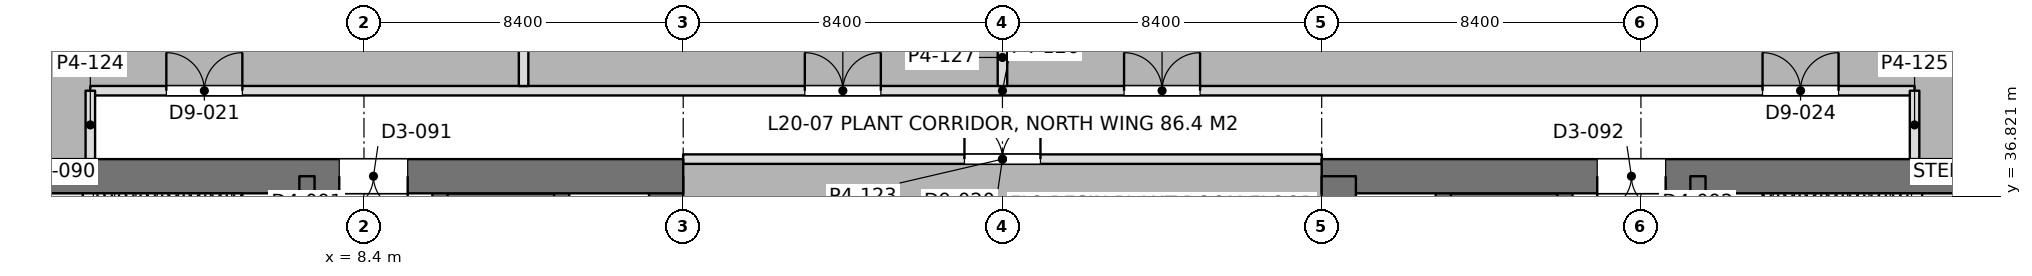
"""IFC4 building model, lengths in metres.
Left out: names, types, materials, properties, quantities, classifications, styles, units other than length and angle.
Written with IfcOpenShell. Run it as: python <this file> out.ifc"""

import sys

from ifc_helpers import new_model, si_unit, direction, frame, frame_2d, origin, place, context, subcontext, project, spatial, rectangle, extrude, element, fill, save


model = new_model("IFC4")
c1 = context("Model", 3, precision=1e-05, world=origin(), true_north=direction((0.0, 1.0)))
c2 = subcontext(c1, "Body", "Model", "MODEL_VIEW")
j1 = project(units=[si_unit("LENGTHUNIT", "METRE"), si_unit("PLANEANGLEUNIT", "RADIAN")], contexts=[c1])
p1 = place(None, origin())
s1 = spatial("IfcSite", under=j1, at=p1, CompositionType="ELEMENT")
p2 = place(p1, origin())
s2 = spatial("IfcBuilding", under=s1, at=p2, CompositionType="ELEMENT")
p3 = place(p2, frame((0.0, 0.0, 90.9)))
s3 = spatial("IfcBuildingStorey", under=s2, at=p3, CompositionType="ELEMENT", Elevation=90.9)
p4 = place(p3, frame((-1.2, 37.35, 0.0), z_axis=(0.0, 0.0, 1.0), x_axis=(1.0, 0.0, 0.0)))
e1 = element("IfcWall", 1, at=p4, inside=s3, PredefinedType="SHEAR", context=c2, shape_type="SweptSolid", body=[
    extrude(rectangle(XDim=18.0, YDim=0.9, at=frame_2d((9.0, 0.0))), origin(), (0.0, 0.0, 1.0), 5.4),
])
p5 = place(p4, frame((8.95, 0.0, 0.0)))
e2 = element("IfcOpeningElement", 2, at=p5, cuts=e1, PredefinedType="OPENING", context=c2, shape_type="SweptSolid", body=[
    extrude(rectangle(XDim=1.8, YDim=2.4, at=frame_2d((0.9, 1.2))), frame((0.0, 0.46, 0.0), z_axis=(0.0, -1.0, 0.0), x_axis=(1.0, 0.0, 0.0)), (0.0, 0.0, 1.0), 0.92),
])
p6 = place(p3, frame((16.35, 13.05, 0.0), z_axis=(0.0, 0.0, 1.0), x_axis=(0.0, 1.0, 0.0)))
e3 = element("IfcWall", 3, at=p6, inside=s3, PredefinedType="SHEAR", context=c2, shape_type="SweptSolid", body=[
    extrude(rectangle(XDim=24.3, YDim=0.9, at=frame_2d((12.15, 0.0))), origin(), (0.0, 0.0, 1.0), 5.4),
])
p7 = place(p3, frame((6.9, 13.05, 0.0), z_axis=(0.0, 0.0, 1.0), x_axis=(0.0, 1.0, 0.0)))
e4 = element("IfcWall", 4, at=p7, inside=s3, PredefinedType="SHEAR", context=c2, shape_type="SweptSolid", body=[
    extrude(rectangle(XDim=24.3, YDim=0.4, at=frame_2d((12.15, 0.0))), origin(), (0.0, 0.0, 1.0), 5.4),
])
p8 = place(p7, frame((1.3, 0.0, 0.0)))
e5 = element("IfcOpeningElement", 5, at=p8, cuts=e4, PredefinedType="OPENING", context=c2, shape_type="SweptSolid", body=[
    extrude(rectangle(XDim=1.0, YDim=2.2, at=frame_2d((0.5, 1.1))), frame((0.0, 0.21, 0.0), z_axis=(0.0, -1.0, 0.0), x_axis=(1.0, 0.0, 0.0)), (0.0, 0.0, 1.0), 0.42),
])
p9 = place(p7, frame((22.0, 0.0, 0.0)))
e6 = element("IfcOpeningElement", 6, at=p9, cuts=e4, PredefinedType="OPENING", context=c2, shape_type="SweptSolid", body=[
    extrude(rectangle(XDim=1.0, YDim=2.2, at=frame_2d((0.5, 1.1))), frame((0.0, 0.21, 0.0), z_axis=(0.0, -1.0, 0.0), x_axis=(1.0, 0.0, 0.0)), (0.0, 0.0, 1.0), 0.42),
])
p10 = place(p7, frame((5.55, 0.0, 0.0)))
e7 = element("IfcOpeningElement", 7, at=p10, cuts=e4, PredefinedType="OPENING", context=c2, shape_type="SweptSolid", body=[
    extrude(rectangle(XDim=1.0, YDim=2.2, at=frame_2d((0.5, 1.1))), frame((0.0, 0.21, 0.0), z_axis=(0.0, -1.0, 0.0), x_axis=(1.0, 0.0, 0.0)), (0.0, 0.0, 1.0), 0.42),
])
p11 = place(p7, frame((9.55, 0.0, 0.0)))
e8 = element("IfcOpeningElement", 8, at=p11, cuts=e4, PredefinedType="OPENING", context=c2, shape_type="SweptSolid", body=[
    extrude(rectangle(XDim=1.0, YDim=2.2, at=frame_2d((0.5, 1.1))), frame((0.0, 0.21, 0.0), z_axis=(0.0, -1.0, 0.0), x_axis=(1.0, 0.0, 0.0)), (0.0, 0.0, 1.0), 0.42),
])
p12 = place(p7, frame((12.8, 0.0, 0.0)))
e9 = element("IfcOpeningElement", 9, at=p12, cuts=e4, PredefinedType="OPENING", context=c2, shape_type="SweptSolid", body=[
    extrude(rectangle(XDim=1.1, YDim=2.2, at=frame_2d((0.55, 1.1))), frame((0.0, 0.21, 0.0), z_axis=(0.0, -1.0, 0.0), x_axis=(1.0, 0.0, 0.0)), (0.0, 0.0, 1.0), 0.42),
])
p13 = place(p7, frame((15.538, 0.0, 0.0)))
e10 = element("IfcOpeningElement", 10, at=p13, cuts=e4, PredefinedType="OPENING", context=c2, shape_type="SweptSolid", body=[
    extrude(rectangle(XDim=1.1, YDim=2.2, at=frame_2d((0.55, 1.1))), frame((0.0, 0.21, 0.0), z_axis=(0.0, -1.0, 0.0), x_axis=(1.0, 0.0, 0.0)), (0.0, 0.0, 1.0), 0.42),
])
p14 = place(p7, frame((18.262, 0.0, 0.0)))
e11 = element("IfcOpeningElement", 11, at=p14, cuts=e4, PredefinedType="OPENING", context=c2, shape_type="SweptSolid", body=[
    extrude(rectangle(XDim=1.1, YDim=2.2, at=frame_2d((0.55, 1.1))), frame((0.0, 0.21, 0.0), z_axis=(0.0, -1.0, 0.0), x_axis=(1.0, 0.0, 0.0)), (0.0, 0.0, 1.0), 0.42),
])
p15 = place(p3, frame((10.4, 13.05, 0.0), z_axis=(0.0, 0.0, 1.0), x_axis=(0.0, 1.0, 0.0)))
e12 = element("IfcWall", 12, at=p15, inside=s3, PredefinedType="SHEAR", context=c2, shape_type="SweptSolid", body=[
    extrude(rectangle(XDim=24.3, YDim=0.4, at=frame_2d((12.15, 0.0))), origin(), (0.0, 0.0, 1.0), 5.4),
])
p16 = place(p15, frame((1.5, 0.0, 0.0)))
e13 = element("IfcOpeningElement", 13, at=p16, cuts=e12, PredefinedType="OPENING", context=c2, shape_type="SweptSolid", body=[
    extrude(rectangle(XDim=1.1, YDim=2.2, at=frame_2d((0.55, 1.1))), frame((0.0, 0.21, 0.0), z_axis=(0.0, -1.0, 0.0), x_axis=(1.0, 0.0, 0.0)), (0.0, 0.0, 1.0), 0.42),
])
p17 = place(p15, frame((4.35, 0.0, 0.0)))
e14 = element("IfcOpeningElement", 14, at=p17, cuts=e12, PredefinedType="OPENING", context=c2, shape_type="SweptSolid", body=[
    extrude(rectangle(XDim=1.1, YDim=2.2, at=frame_2d((0.55, 1.1))), frame((0.0, 0.21, 0.0), z_axis=(0.0, -1.0, 0.0), x_axis=(1.0, 0.0, 0.0)), (0.0, 0.0, 1.0), 0.42),
])
p18 = place(p15, frame((7.2, 0.0, 0.0)))
e15 = element("IfcOpeningElement", 15, at=p18, cuts=e12, PredefinedType="OPENING", context=c2, shape_type="SweptSolid", body=[
    extrude(rectangle(XDim=1.1, YDim=2.2, at=frame_2d((0.55, 1.1))), frame((0.0, 0.21, 0.0), z_axis=(0.0, -1.0, 0.0), x_axis=(1.0, 0.0, 0.0)), (0.0, 0.0, 1.0), 0.42),
])
p19 = place(p15, frame((21.45, 0.0, 0.0)))
e16 = element("IfcOpeningElement", 16, at=p19, cuts=e12, PredefinedType="OPENING", context=c2, shape_type="SweptSolid", body=[
    extrude(rectangle(XDim=1.1, YDim=2.2, at=frame_2d((0.55, 1.1))), frame((0.0, 0.21, 0.0), z_axis=(0.0, -1.0, 0.0), x_axis=(1.0, 0.0, 0.0)), (0.0, 0.0, 1.0), 0.42),
])
p20 = place(p3, frame((13.6, 13.05, 0.0), z_axis=(0.0, 0.0, 1.0), x_axis=(0.0, 1.0, 0.0)))
e17 = element("IfcWall", 17, at=p20, inside=s3, PredefinedType="SHEAR", context=c2, shape_type="SweptSolid", body=[
    extrude(rectangle(XDim=24.3, YDim=0.4, at=frame_2d((12.15, 0.0))), origin(), (0.0, 0.0, 1.0), 5.4),
])
p21 = place(p3, frame((10.4, 36.625, 0.0), z_axis=(0.0, 0.0, 1.0), x_axis=(1.0, 0.0, 0.0)))
e18 = element("IfcWall", 18, at=p21, inside=s3, PredefinedType="SHEAR", context=c2, shape_type="SweptSolid", body=[
    extrude(rectangle(XDim=3.2, YDim=0.55, at=frame_2d((1.6, 0.0))), origin(), (0.0, 0.0, 1.0), 5.4),
])
p22 = place(p3, frame((33.6, 37.35, 0.0), z_axis=(0.0, 0.0, 1.0), x_axis=(1.0, 0.0, 0.0)))
e19 = element("IfcWall", 19, at=p22, inside=s3, PredefinedType="SHEAR", context=c2, shape_type="SweptSolid", body=[
    extrude(rectangle(XDim=18.0, YDim=0.9, at=frame_2d((9.0, 0.0))), origin(), (0.0, 0.0, 1.0), 5.4),
])
p23 = place(p22, frame((7.25, 0.0, 0.0)))
e20 = element("IfcOpeningElement", 20, at=p23, cuts=e19, PredefinedType="OPENING", context=c2, shape_type="SweptSolid", body=[
    extrude(rectangle(XDim=1.8, YDim=2.4, at=frame_2d((0.9, 1.2))), frame((0.0, 0.46, 0.0), z_axis=(0.0, -1.0, 0.0), x_axis=(1.0, 0.0, 0.0)), (0.0, 0.0, 1.0), 0.92),
])
p24 = place(p3, frame((34.05, 13.05, 0.0), z_axis=(0.0, 0.0, 1.0), x_axis=(0.0, 1.0, 0.0)))
e21 = element("IfcWall", 21, at=p24, inside=s3, PredefinedType="SHEAR", context=c2, shape_type="SweptSolid", body=[
    extrude(rectangle(XDim=24.3, YDim=0.9, at=frame_2d((12.15, 0.0))), origin(), (0.0, 0.0, 1.0), 5.4),
])
p25 = place(p3, frame((43.5, 13.05, 0.0), z_axis=(0.0, 0.0, 1.0), x_axis=(0.0, 1.0, 0.0)))
e22 = element("IfcWall", 22, at=p25, inside=s3, PredefinedType="SHEAR", context=c2, shape_type="SweptSolid", body=[
    extrude(rectangle(XDim=24.3, YDim=0.4, at=frame_2d((12.15, 0.0))), origin(), (0.0, 0.0, 1.0), 5.4),
])
p26 = place(p25, frame((1.3, 0.0, 0.0)))
e23 = element("IfcOpeningElement", 23, at=p26, cuts=e22, PredefinedType="OPENING", context=c2, shape_type="SweptSolid", body=[
    extrude(rectangle(XDim=1.0, YDim=2.2, at=frame_2d((0.5, 1.1))), frame((0.0, 0.21, 0.0), z_axis=(0.0, -1.0, 0.0), x_axis=(1.0, 0.0, 0.0)), (0.0, 0.0, 1.0), 0.42),
])
p27 = place(p25, frame((22.0, 0.0, 0.0)))
e24 = element("IfcOpeningElement", 24, at=p27, cuts=e22, PredefinedType="OPENING", context=c2, shape_type="SweptSolid", body=[
    extrude(rectangle(XDim=1.0, YDim=2.2, at=frame_2d((0.5, 1.1))), frame((0.0, 0.21, 0.0), z_axis=(0.0, -1.0, 0.0), x_axis=(1.0, 0.0, 0.0)), (0.0, 0.0, 1.0), 0.42),
])
p28 = place(p25, frame((5.55, 0.0, 0.0)))
e25 = element("IfcOpeningElement", 25, at=p28, cuts=e22, PredefinedType="OPENING", context=c2, shape_type="SweptSolid", body=[
    extrude(rectangle(XDim=1.0, YDim=2.2, at=frame_2d((0.5, 1.1))), frame((0.0, 0.21, 0.0), z_axis=(0.0, -1.0, 0.0), x_axis=(1.0, 0.0, 0.0)), (0.0, 0.0, 1.0), 0.42),
])
p29 = place(p25, frame((9.55, 0.0, 0.0)))
e26 = element("IfcOpeningElement", 26, at=p29, cuts=e22, PredefinedType="OPENING", context=c2, shape_type="SweptSolid", body=[
    extrude(rectangle(XDim=1.0, YDim=2.2, at=frame_2d((0.5, 1.1))), frame((0.0, 0.21, 0.0), z_axis=(0.0, -1.0, 0.0), x_axis=(1.0, 0.0, 0.0)), (0.0, 0.0, 1.0), 0.42),
])
p30 = place(p25, frame((12.8, 0.0, 0.0)))
e27 = element("IfcOpeningElement", 27, at=p30, cuts=e22, PredefinedType="OPENING", context=c2, shape_type="SweptSolid", body=[
    extrude(rectangle(XDim=1.1, YDim=2.2, at=frame_2d((0.55, 1.1))), frame((0.0, 0.21, 0.0), z_axis=(0.0, -1.0, 0.0), x_axis=(1.0, 0.0, 0.0)), (0.0, 0.0, 1.0), 0.42),
])
p31 = place(p25, frame((15.538, 0.0, 0.0)))
e28 = element("IfcOpeningElement", 28, at=p31, cuts=e22, PredefinedType="OPENING", context=c2, shape_type="SweptSolid", body=[
    extrude(rectangle(XDim=1.1, YDim=2.2, at=frame_2d((0.55, 1.1))), frame((0.0, 0.21, 0.0), z_axis=(0.0, -1.0, 0.0), x_axis=(1.0, 0.0, 0.0)), (0.0, 0.0, 1.0), 0.42),
])
p32 = place(p25, frame((18.262, 0.0, 0.0)))
e29 = element("IfcOpeningElement", 29, at=p32, cuts=e22, PredefinedType="OPENING", context=c2, shape_type="SweptSolid", body=[
    extrude(rectangle(XDim=1.1, YDim=2.2, at=frame_2d((0.55, 1.1))), frame((0.0, 0.21, 0.0), z_axis=(0.0, -1.0, 0.0), x_axis=(1.0, 0.0, 0.0)), (0.0, 0.0, 1.0), 0.42),
])
p33 = place(p3, frame((40.0, 13.05, 0.0), z_axis=(0.0, 0.0, 1.0), x_axis=(0.0, 1.0, 0.0)))
e30 = element("IfcWall", 30, at=p33, inside=s3, PredefinedType="SHEAR", context=c2, shape_type="SweptSolid", body=[
    extrude(rectangle(XDim=24.3, YDim=0.4, at=frame_2d((12.15, 0.0))), origin(), (0.0, 0.0, 1.0), 5.4),
])
p34 = place(p33, frame((1.5, 0.0, 0.0)))
e31 = element("IfcOpeningElement", 31, at=p34, cuts=e30, PredefinedType="OPENING", context=c2, shape_type="SweptSolid", body=[
    extrude(rectangle(XDim=1.1, YDim=2.2, at=frame_2d((0.55, 1.1))), frame((0.0, 0.21, 0.0), z_axis=(0.0, -1.0, 0.0), x_axis=(1.0, 0.0, 0.0)), (0.0, 0.0, 1.0), 0.42),
])
p35 = place(p33, frame((4.35, 0.0, 0.0)))
e32 = element("IfcOpeningElement", 32, at=p35, cuts=e30, PredefinedType="OPENING", context=c2, shape_type="SweptSolid", body=[
    extrude(rectangle(XDim=1.1, YDim=2.2, at=frame_2d((0.55, 1.1))), frame((0.0, 0.21, 0.0), z_axis=(0.0, -1.0, 0.0), x_axis=(1.0, 0.0, 0.0)), (0.0, 0.0, 1.0), 0.42),
])
p36 = place(p33, frame((7.2, 0.0, 0.0)))
e33 = element("IfcOpeningElement", 33, at=p36, cuts=e30, PredefinedType="OPENING", context=c2, shape_type="SweptSolid", body=[
    extrude(rectangle(XDim=1.1, YDim=2.2, at=frame_2d((0.55, 1.1))), frame((0.0, 0.21, 0.0), z_axis=(0.0, -1.0, 0.0), x_axis=(1.0, 0.0, 0.0)), (0.0, 0.0, 1.0), 0.42),
])
p37 = place(p33, frame((21.45, 0.0, 0.0)))
e34 = element("IfcOpeningElement", 34, at=p37, cuts=e30, PredefinedType="OPENING", context=c2, shape_type="SweptSolid", body=[
    extrude(rectangle(XDim=1.1, YDim=2.2, at=frame_2d((0.55, 1.1))), frame((0.0, 0.21, 0.0), z_axis=(0.0, -1.0, 0.0), x_axis=(1.0, 0.0, 0.0)), (0.0, 0.0, 1.0), 0.42),
])
p38 = place(p3, frame((36.8, 13.05, 0.0), z_axis=(0.0, 0.0, 1.0), x_axis=(0.0, 1.0, 0.0)))
e35 = element("IfcWall", 35, at=p38, inside=s3, PredefinedType="SHEAR", context=c2, shape_type="SweptSolid", body=[
    extrude(rectangle(XDim=24.3, YDim=0.4, at=frame_2d((12.15, 0.0))), origin(), (0.0, 0.0, 1.0), 5.4),
])
p39 = place(p3, frame((40.0, 36.625, 0.0), z_axis=(0.0, 0.0, 1.0), x_axis=(-1.0, 0.0, 0.0)))
e36 = element("IfcWall", 36, at=p39, inside=s3, PredefinedType="SHEAR", context=c2, shape_type="SweptSolid", body=[
    extrude(rectangle(XDim=3.2, YDim=0.55, at=frame_2d((1.6, 0.0))), origin(), (0.0, 0.0, 1.0), 5.4),
])
p40 = place(p3, frame((1.2, 39.6, 0.0), z_axis=(0.0, 0.0, 1.0), x_axis=(1.0, 0.0, 0.0)))
e37 = element("IfcWall", 37, at=p40, inside=s3, PredefinedType="PARTITIONING", context=c2, shape_type="SweptSolid", body=[
    extrude(rectangle(XDim=48.0, YDim=0.25, at=frame_2d((24.0, 0.0))), origin(), (0.0, 0.0, 1.0), 4.64),
])
p41 = place(p40, frame((2.0, 0.0, 0.0)))
e38 = element("IfcOpeningElement", 38, at=p41, cuts=e37, PredefinedType="OPENING", context=c2, shape_type="SweptSolid", body=[
    extrude(rectangle(XDim=2.0, YDim=2.4, at=frame_2d((1.0, 1.2))), frame((0.0, 0.135, 0.0), z_axis=(0.0, -1.0, 0.0), x_axis=(1.0, 0.0, 0.0)), (0.0, 0.0, 1.0), 0.27),
])
p42 = place(p40, frame((18.8, 0.0, 0.0)))
e39 = element("IfcOpeningElement", 39, at=p42, cuts=e37, PredefinedType="OPENING", context=c2, shape_type="SweptSolid", body=[
    extrude(rectangle(XDim=2.0, YDim=2.4, at=frame_2d((1.0, 1.2))), frame((0.0, 0.135, 0.0), z_axis=(0.0, -1.0, 0.0), x_axis=(1.0, 0.0, 0.0)), (0.0, 0.0, 1.0), 0.27),
])
p43 = place(p40, frame((27.2, 0.0, 0.0)))
e40 = element("IfcOpeningElement", 40, at=p43, cuts=e37, PredefinedType="OPENING", context=c2, shape_type="SweptSolid", body=[
    extrude(rectangle(XDim=2.0, YDim=2.4, at=frame_2d((1.0, 1.2))), frame((0.0, 0.135, 0.0), z_axis=(0.0, -1.0, 0.0), x_axis=(1.0, 0.0, 0.0)), (0.0, 0.0, 1.0), 0.27),
])
p44 = place(p40, frame((44.0, 0.0, 0.0)))
e41 = element("IfcOpeningElement", 41, at=p44, cuts=e37, PredefinedType="OPENING", context=c2, shape_type="SweptSolid", body=[
    extrude(rectangle(XDim=2.0, YDim=2.4, at=frame_2d((1.0, 1.2))), frame((0.0, 0.135, 0.0), z_axis=(0.0, -1.0, 0.0), x_axis=(1.0, 0.0, 0.0)), (0.0, 0.0, 1.0), 0.27),
])
for number, where, z_axis, x_axis in (
    (42, (1.2, 37.8, 0.0), (0.0, 0.0, 1.0), (0.0, 1.0, 0.0)),
    (43, (49.2, 37.8, 0.0), (0.0, 0.0, 1.0), (0.0, 1.0, 0.0)),
):
    element("IfcWall", number, at=place(p3, frame(where, z_axis=z_axis, x_axis=x_axis)), inside=s3, PredefinedType="PARTITIONING", context=c2, shape_type="SweptSolid", body=[
        extrude(rectangle(XDim=1.8, YDim=0.25, at=frame_2d((0.9, 0.0))), origin(), (0.0, 0.0, 1.0), 5.24),
    ])
p45 = place(p3, frame((25.2, 39.724, 0.0), z_axis=(0.0, 0.0, 1.0), x_axis=(0.0, 1.0, 0.0)))
e44 = element("IfcWall", 44, at=p45, inside=s3, PredefinedType="PARTITIONING", context=c2, shape_type="SweptSolid", body=[
    extrude(rectangle(XDim=1.502, YDim=0.25, at=frame_2d((0.751, 0.0))), origin(), (0.0, 0.0, 1.0), 4.64),
])
p46 = place(p3, frame((12.6, 39.724, 0.0), z_axis=(0.0, 0.0, 1.0), x_axis=(0.0, 1.0, 0.0)))
e45 = element("IfcWall", 45, at=p46, inside=s3, PredefinedType="PARTITIONING", context=c2, shape_type="SweptSolid", body=[
    extrude(rectangle(XDim=10.076, YDim=0.25, at=frame_2d((5.038, 0.0))), origin(), (0.0, 0.0, 1.0), 4.64),
])
p47 = place(p3, frame((16.798, 37.8, 0.0), z_axis=(0.0, 0.0, 1.0), x_axis=(1.0, 0.0, 0.0)))
e46 = element("IfcWall", 46, at=p47, inside=s3, PredefinedType="PARTITIONING", context=c2, shape_type="SweptSolid", body=[
    extrude(rectangle(XDim=16.804, YDim=0.25, at=frame_2d((8.402, 0.0))), origin(), (0.0, 0.0, 1.0), 4.64),
])
p48 = place(p47, frame((7.402, 0.0, 0.0)))
e47 = element("IfcOpeningElement", 47, at=p48, cuts=e46, PredefinedType="OPENING", context=c2, shape_type="SweptSolid", body=[
    extrude(rectangle(XDim=2.0, YDim=2.4, at=frame_2d((1.0, 1.2))), frame((0.0, 0.135, 0.0), z_axis=(0.0, -1.0, 0.0), x_axis=(1.0, 0.0, 0.0)), (0.0, 0.0, 1.0), 0.27),
])
p49 = place(p5, frame((1.8, 0.0, 0.0), z_axis=(0.0, 0.0, 1.0), x_axis=(-1.0, 0.0, 0.0)))
e48 = element("IfcDoor", 48, at=p49, inside=s3, OperationType="DOUBLE_DOOR_SINGLE_SWING", PredefinedType="DOOR", context=c2, shape_type="SweptSolid", body=[
    extrude(rectangle(XDim=1.8, YDim=2.4, at=frame_2d((0.9, 1.2))), frame((0.0, 0.025, 0.0), z_axis=(0.0, -1.0, 0.0), x_axis=(1.0, 0.0, 0.0)), (0.0, 0.0, 1.0), 0.05),
])
fill(e2, e48)
p50 = place(p23, frame((1.8, 0.0, 0.0), z_axis=(0.0, 0.0, 1.0), x_axis=(-1.0, 0.0, 0.0)))
e49 = element("IfcDoor", 49, at=p50, inside=s3, OperationType="DOUBLE_DOOR_SINGLE_SWING", PredefinedType="DOOR", context=c2, shape_type="SweptSolid", body=[
    extrude(rectangle(XDim=1.8, YDim=2.4, at=frame_2d((0.9, 1.2))), frame((0.0, 0.025, 0.0), z_axis=(0.0, -1.0, 0.0), x_axis=(1.0, 0.0, 0.0)), (0.0, 0.0, 1.0), 0.05),
])
fill(e20, e49)
p51 = place(p41, origin())
e50 = element("IfcDoor", 50, at=p51, inside=s3, OperationType="DOUBLE_DOOR_SINGLE_SWING", PredefinedType="DOOR", context=c2, shape_type="SweptSolid", body=[
    extrude(rectangle(XDim=2.0, YDim=2.4, at=frame_2d((1.0, 1.2))), frame((0.0, 0.025, 0.0), z_axis=(0.0, -1.0, 0.0), x_axis=(1.0, 0.0, 0.0)), (0.0, 0.0, 1.0), 0.05),
])
fill(e38, e50)
p52 = place(p42, origin())
e51 = element("IfcDoor", 51, at=p52, inside=s3, OperationType="DOUBLE_DOOR_SINGLE_SWING", PredefinedType="DOOR", context=c2, shape_type="SweptSolid", body=[
    extrude(rectangle(XDim=2.0, YDim=2.4, at=frame_2d((1.0, 1.2))), frame((0.0, 0.025, 0.0), z_axis=(0.0, -1.0, 0.0), x_axis=(1.0, 0.0, 0.0)), (0.0, 0.0, 1.0), 0.05),
])
fill(e39, e51)
p53 = place(p43, origin())
e52 = element("IfcDoor", 52, at=p53, inside=s3, OperationType="DOUBLE_DOOR_SINGLE_SWING", PredefinedType="DOOR", context=c2, shape_type="SweptSolid", body=[
    extrude(rectangle(XDim=2.0, YDim=2.4, at=frame_2d((1.0, 1.2))), frame((0.0, 0.025, 0.0), z_axis=(0.0, -1.0, 0.0), x_axis=(1.0, 0.0, 0.0)), (0.0, 0.0, 1.0), 0.05),
])
fill(e40, e52)
p54 = place(p44, origin())
e53 = element("IfcDoor", 53, at=p54, inside=s3, OperationType="DOUBLE_DOOR_SINGLE_SWING", PredefinedType="DOOR", context=c2, shape_type="SweptSolid", body=[
    extrude(rectangle(XDim=2.0, YDim=2.4, at=frame_2d((1.0, 1.2))), frame((0.0, 0.025, 0.0), z_axis=(0.0, -1.0, 0.0), x_axis=(1.0, 0.0, 0.0)), (0.0, 0.0, 1.0), 0.05),
])
fill(e41, e53)
p55 = place(p48, origin())
e54 = element("IfcDoor", 54, at=p55, inside=s3, OperationType="DOUBLE_DOOR_SINGLE_SWING", PredefinedType="DOOR", context=c2, shape_type="SweptSolid", body=[
    extrude(rectangle(XDim=2.0, YDim=2.4, at=frame_2d((1.0, 1.2))), frame((0.0, 0.025, 0.0), z_axis=(0.0, -1.0, 0.0), x_axis=(1.0, 0.0, 0.0)), (0.0, 0.0, 1.0), 0.05),
])
fill(e47, e54)
save(model, sys.argv[1])
